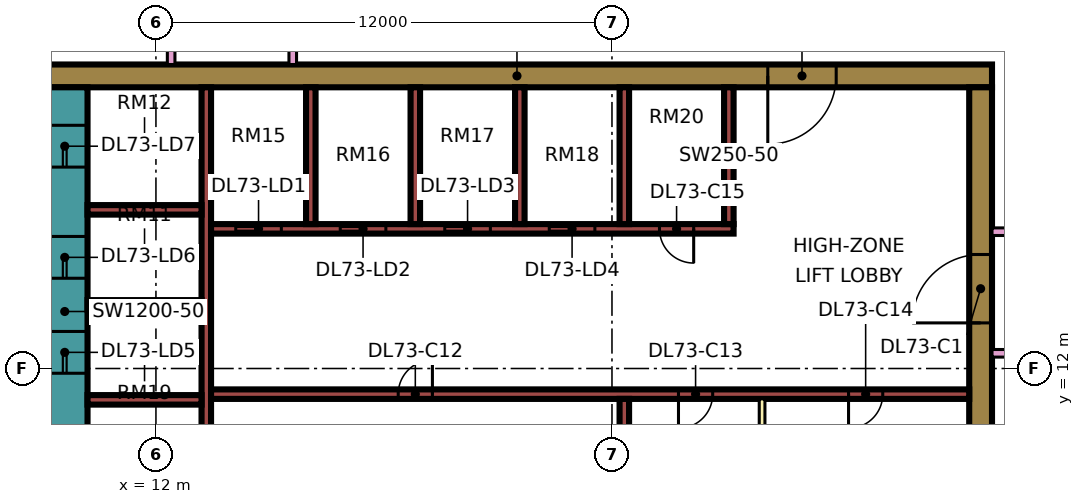
"""IFC4 building model, lengths in metres.
Left out: names, types, materials, properties, quantities, classifications, styles, units other than length and angle.
Written with IfcOpenShell. Run it as: python <this file> out.ifc"""

import sys

from ifc_helpers import new_model, si_unit, direction, frame, frame_2d, origin, place, context, subcontext, project, spatial, rectangle, extrude, element, fill, save


model = new_model("IFC4")
c1 = context("Model", 3, precision=1e-05, world=origin(), true_north=direction((0.0, 1.0)))
c2 = subcontext(c1, "Body", "Model", "MODEL_VIEW")
j1 = project(units=[si_unit("LENGTHUNIT", "METRE"), si_unit("PLANEANGLEUNIT", "RADIAN")], contexts=[c1])
p1 = place(None, origin())
s1 = spatial("IfcSite", under=j1, at=p1, CompositionType="ELEMENT")
p2 = place(p1, origin())
s2 = spatial("IfcBuilding", under=s1, at=p2, CompositionType="ELEMENT")
p3 = place(p2, frame((0.0, 0.0, 310.9)))
s3 = spatial("IfcBuildingStorey", under=s2, at=p3, CompositionType="ELEMENT", Elevation=310.9)
p4 = place(p3, frame((9.0, 19.7, 0.0), z_axis=(0.0, 0.0, 1.0), x_axis=(1.0, 0.0, 0.0)))
e1 = element("IfcWall", 1, at=p4, inside=s3, PredefinedType="SHEAR", context=c2, shape_type="SweptSolid", body=[
    extrude(rectangle(XDim=25.0, YDim=0.6, at=frame_2d((12.5, 0.0))), origin(), (0.0, 0.0, 1.0), 3.75),
])
p5 = place(p4, frame((19.1, 0.0, 0.0)))
e2 = element("IfcOpeningElement", 2, at=p5, cuts=e1, PredefinedType="OPENING", context=c2, shape_type="SweptSolid", body=[
    extrude(rectangle(XDim=1.8, YDim=2.4, at=frame_2d((0.9, 1.2))), frame((0.0, 0.31, 0.0), z_axis=(0.0, -1.0, 0.0), x_axis=(1.0, 0.0, 0.0)), (0.0, 0.0, 1.0), 0.62),
])
p6 = place(p3, frame((9.6, 7.6, 0.0), z_axis=(0.0, 0.0, 1.0), x_axis=(0.0, 1.0, 0.0)))
e3 = element("IfcWall", 3, at=p6, inside=s3, PredefinedType="SHEAR", context=c2, shape_type="SweptSolid", body=[
    extrude(rectangle(XDim=11.8, YDim=1.2, at=frame_2d((5.9, 0.0))), origin(), (0.0, 0.0, 1.0), 3.75),
])
p7 = place(p6, frame((4.275, 0.0, 0.0)))
e4 = element("IfcOpeningElement", 4, at=p7, cuts=e3, PredefinedType="OPENING", context=c2, shape_type="SweptSolid", body=[
    extrude(rectangle(XDim=1.1, YDim=2.2, at=frame_2d((0.55, 1.1))), frame((0.0, 0.61, 0.0), z_axis=(0.0, -1.0, 0.0), x_axis=(1.0, 0.0, 0.0)), (0.0, 0.0, 1.0), 1.22),
])
p8 = place(p6, frame((6.775, 0.0, 0.0)))
e5 = element("IfcOpeningElement", 5, at=p8, cuts=e3, PredefinedType="OPENING", context=c2, shape_type="SweptSolid", body=[
    extrude(rectangle(XDim=1.1, YDim=2.2, at=frame_2d((0.55, 1.1))), frame((0.0, 0.61, 0.0), z_axis=(0.0, -1.0, 0.0), x_axis=(1.0, 0.0, 0.0)), (0.0, 0.0, 1.0), 1.22),
])
p9 = place(p6, frame((9.7, 0.0, 0.0)))
e6 = element("IfcOpeningElement", 6, at=p9, cuts=e3, PredefinedType="OPENING", context=c2, shape_type="SweptSolid", body=[
    extrude(rectangle(XDim=1.1, YDim=2.2, at=frame_2d((0.55, 1.1))), frame((0.0, 0.61, 0.0), z_axis=(0.0, -1.0, 0.0), x_axis=(1.0, 0.0, 0.0)), (0.0, 0.0, 1.0), 1.22),
])
p10 = place(p6, frame((1.95, 0.0, 0.0)))
e7 = element("IfcOpeningElement", 7, at=p10, cuts=e3, PredefinedType="OPENING", context=c2, shape_type="SweptSolid", body=[
    extrude(rectangle(XDim=0.9, YDim=2.1, at=frame_2d((0.45, 1.05))), frame((0.0, 0.61, 0.0), z_axis=(0.0, -1.0, 0.0), x_axis=(1.0, 0.0, 0.0)), (0.0, 0.0, 1.0), 1.22),
])
p11 = place(p3, frame((33.7, 7.6, 0.0), z_axis=(0.0, 0.0, 1.0), x_axis=(0.0, 1.0, 0.0)))
e8 = element("IfcWall", 8, at=p11, inside=s3, PredefinedType="SHEAR", context=c2, shape_type="SweptSolid", body=[
    extrude(rectangle(XDim=11.8, YDim=0.6, at=frame_2d((5.9, 0.0))), origin(), (0.0, 0.0, 1.0), 3.75),
])
p12 = place(p11, frame((5.6, 0.0, 0.0)))
e9 = element("IfcOpeningElement", 9, at=p12, cuts=e8, PredefinedType="OPENING", context=c2, shape_type="SweptSolid", body=[
    extrude(rectangle(XDim=1.8, YDim=2.4, at=frame_2d((0.9, 1.2))), frame((0.0, 0.31, 0.0), z_axis=(0.0, -1.0, 0.0), x_axis=(1.0, 0.0, 0.0)), (0.0, 0.0, 1.0), 0.62),
])
p13 = place(p3, frame((13.325, 7.6, 0.0), z_axis=(0.0, 0.0, 1.0), x_axis=(0.0, 1.0, 0.0)))
e10 = element("IfcWall", 10, at=p13, inside=s3, PredefinedType="SHEAR", context=c2, shape_type="SweptSolid", body=[
    extrude(rectangle(XDim=11.8, YDim=0.25, at=frame_2d((5.9, 0.0))), origin(), (0.0, 0.0, 1.0), 3.75),
])
p14 = place(p3, frame((13.45, 11.325, 0.0), z_axis=(0.0, 0.0, 1.0), x_axis=(1.0, 0.0, 0.0)))
e11 = element("IfcWall", 11, at=p14, inside=s3, PredefinedType="SHEAR", context=c2, shape_type="SweptSolid", body=[
    extrude(rectangle(XDim=19.95, YDim=0.25, at=frame_2d((9.975, 0.0))), origin(), (0.0, 0.0, 1.0), 3.75),
])
p15 = place(p14, frame((4.925, 0.0, 0.0)))
e12 = element("IfcOpeningElement", 12, at=p15, cuts=e11, PredefinedType="OPENING", context=c2, shape_type="SweptSolid", body=[
    extrude(rectangle(XDim=0.9, YDim=2.1, at=frame_2d((0.45, 1.05))), frame((0.0, 0.135, 0.0), z_axis=(0.0, -1.0, 0.0), x_axis=(1.0, 0.0, 0.0)), (0.0, 0.0, 1.0), 0.27),
])
p16 = place(p14, frame((12.3, 0.0, 0.0)))
e13 = element("IfcOpeningElement", 13, at=p16, cuts=e11, PredefinedType="OPENING", context=c2, shape_type="SweptSolid", body=[
    extrude(rectangle(XDim=0.9, YDim=2.1, at=frame_2d((0.45, 1.05))), frame((0.0, 0.135, 0.0), z_axis=(0.0, -1.0, 0.0), x_axis=(1.0, 0.0, 0.0)), (0.0, 0.0, 1.0), 0.27),
])
p17 = place(p14, frame((16.775, 0.0, 0.0)))
e14 = element("IfcOpeningElement", 14, at=p17, cuts=e11, PredefinedType="OPENING", context=c2, shape_type="SweptSolid", body=[
    extrude(rectangle(XDim=0.9, YDim=2.1, at=frame_2d((0.45, 1.05))), frame((0.0, 0.135, 0.0), z_axis=(0.0, -1.0, 0.0), x_axis=(1.0, 0.0, 0.0)), (0.0, 0.0, 1.0), 0.27),
])
p18 = place(p3, frame((13.45, 15.675, 0.0), z_axis=(0.0, 0.0, 1.0), x_axis=(1.0, 0.0, 0.0)))
e15 = element("IfcWall", 15, at=p18, inside=s3, PredefinedType="SHEAR", context=c2, shape_type="SweptSolid", body=[
    extrude(rectangle(XDim=13.75, YDim=0.25, at=frame_2d((6.875, 0.0))), origin(), (0.0, 0.0, 1.0), 3.75),
])
p19 = place(p18, frame((0.65, 0.0, 0.0)))
e16 = element("IfcOpeningElement", 16, at=p19, cuts=e15, PredefinedType="OPENING", context=c2, shape_type="SweptSolid", body=[
    extrude(rectangle(XDim=1.2, YDim=2.2, at=frame_2d((0.6, 1.1))), frame((0.0, 0.135, 0.0), z_axis=(0.0, -1.0, 0.0), x_axis=(1.0, 0.0, 0.0)), (0.0, 0.0, 1.0), 0.27),
])
p20 = place(p18, frame((3.4, 0.0, 0.0)))
e17 = element("IfcOpeningElement", 17, at=p20, cuts=e15, PredefinedType="OPENING", context=c2, shape_type="SweptSolid", body=[
    extrude(rectangle(XDim=1.2, YDim=2.2, at=frame_2d((0.6, 1.1))), frame((0.0, 0.135, 0.0), z_axis=(0.0, -1.0, 0.0), x_axis=(1.0, 0.0, 0.0)), (0.0, 0.0, 1.0), 0.27),
])
p21 = place(p18, frame((6.15, 0.0, 0.0)))
e18 = element("IfcOpeningElement", 18, at=p21, cuts=e15, PredefinedType="OPENING", context=c2, shape_type="SweptSolid", body=[
    extrude(rectangle(XDim=1.2, YDim=2.2, at=frame_2d((0.6, 1.1))), frame((0.0, 0.135, 0.0), z_axis=(0.0, -1.0, 0.0), x_axis=(1.0, 0.0, 0.0)), (0.0, 0.0, 1.0), 0.27),
])
p22 = place(p18, frame((8.9, 0.0, 0.0)))
e19 = element("IfcOpeningElement", 19, at=p22, cuts=e15, PredefinedType="OPENING", context=c2, shape_type="SweptSolid", body=[
    extrude(rectangle(XDim=1.2, YDim=2.2, at=frame_2d((0.6, 1.1))), frame((0.0, 0.135, 0.0), z_axis=(0.0, -1.0, 0.0), x_axis=(1.0, 0.0, 0.0)), (0.0, 0.0, 1.0), 0.27),
])
p23 = place(p18, frame((11.8, 0.0, 0.0)))
e20 = element("IfcOpeningElement", 20, at=p23, cuts=e15, PredefinedType="OPENING", context=c2, shape_type="SweptSolid", body=[
    extrude(rectangle(XDim=0.9, YDim=2.1, at=frame_2d((0.45, 1.05))), frame((0.0, 0.135, 0.0), z_axis=(0.0, -1.0, 0.0), x_axis=(1.0, 0.0, 0.0)), (0.0, 0.0, 1.0), 0.27),
])
for number, where, z_axis, x_axis in (
    (21, (10.2, 11.175, 0.0), (0.0, 0.0, 1.0), (1.0, 0.0, 0.0)),
    (22, (10.2, 13.675, 0.0), (0.0, 0.0, 1.0), (1.0, 0.0, 0.0)),
    (23, (10.2, 16.175, 0.0), (0.0, 0.0, 1.0), (1.0, 0.0, 0.0)),
):
    element("IfcWall", number, at=place(p3, frame(where, z_axis=z_axis, x_axis=x_axis)), inside=s3, PredefinedType="SHEAR", context=c2, shape_type="SweptSolid", body=[
        extrude(rectangle(XDim=3.0, YDim=0.25, at=frame_2d((1.5, 0.0))), origin(), (0.0, 0.0, 1.0), 3.75),
    ])
for number, where, z_axis, x_axis in (
    (24, (24.325, 7.6, 0.0), (0.0, 0.0, 1.0), (0.0, 1.0, 0.0)),
    (25, (16.075, 15.8, 0.0), (0.0, 0.0, 1.0), (0.0, 1.0, 0.0)),
    (26, (18.825, 15.8, 0.0), (0.0, 0.0, 1.0), (0.0, 1.0, 0.0)),
    (27, (21.575, 15.8, 0.0), (0.0, 0.0, 1.0), (0.0, 1.0, 0.0)),
    (28, (24.325, 15.8, 0.0), (0.0, 0.0, 1.0), (0.0, 1.0, 0.0)),
    (29, (27.075, 15.8, 0.0), (0.0, 0.0, 1.0), (0.0, 1.0, 0.0)),
):
    element("IfcWall", number, at=place(p3, frame(where, z_axis=z_axis, x_axis=x_axis)), inside=s3, PredefinedType="SHEAR", context=c2, shape_type="SweptSolid", body=[
        extrude(rectangle(XDim=3.6, YDim=0.25, at=frame_2d((1.8, 0.0))), origin(), (0.0, 0.0, 1.0), 3.75),
    ])
p24 = place(p3, frame((-1.447, 12.553, 0.0), z_axis=(0.0, 0.0, 1.0), x_axis=(0.707106781187, -0.707106781187, 0.0)))
e30 = element("IfcWall", 30, at=p24, inside=s3, PredefinedType="SOLIDWALL", context=c2, shape_type="SweptSolid", body=[
    extrude(rectangle(XDim=19.799, YDim=0.15, at=frame_2d((9.899, 0.0))), origin(), (0.0, 0.0, 1.0), 3.35),
])
p25 = place(p24, frame((2.212, 0.0, 0.45)))
e31 = element("IfcOpeningElement", 31, at=p25, cuts=e30, PredefinedType="OPENING", context=c2, shape_type="SweptSolid", body=[
    extrude(rectangle(XDim=3.0, YDim=2.4, at=frame_2d((1.5, 1.2))), frame((0.0, 0.085, 0.0), z_axis=(0.0, -1.0, 0.0), x_axis=(1.0, 0.0, 0.0)), (0.0, 0.0, 1.0), 0.17),
])
p26 = place(p24, frame((10.216, 0.0, 0.45)))
e32 = element("IfcOpeningElement", 32, at=p26, cuts=e30, PredefinedType="OPENING", context=c2, shape_type="SweptSolid", body=[
    extrude(rectangle(XDim=3.0, YDim=2.4, at=frame_2d((1.5, 1.2))), frame((0.0, 0.085, 0.0), z_axis=(0.0, -1.0, 0.0), x_axis=(1.0, 0.0, 0.0)), (0.0, 0.0, 1.0), 0.17),
])
p27 = place(p3, frame((27.95, 7.6, 0.0), z_axis=(0.0, 0.0, 1.0), x_axis=(0.0, 1.0, 0.0)))
e33 = element("IfcWall", 33, at=p27, inside=s3, PredefinedType="PARTITIONING", context=c2, shape_type="SweptSolid", body=[
    extrude(rectangle(XDim=3.6, YDim=0.15, at=frame_2d((1.8, 0.0))), origin(), (0.0, 0.0, 1.0), 3.35),
])
p28 = place(p3, frame((12.4, 20.0, 0.0), z_axis=(0.0, 0.0, 1.0), x_axis=(0.0, 1.0, 0.0)))
e34 = element("IfcWall", 34, at=p28, inside=s3, PredefinedType="PARTITIONING", context=c2, shape_type="SweptSolid", body=[
    extrude(rectangle(XDim=33.926, YDim=0.2, at=frame_2d((16.963, 0.0))), origin(), (0.0, 0.0, 1.0), 3.35),
])
p29 = place(p28, frame((31.8, 0.0, 0.0)))
e35 = element("IfcOpeningElement", 35, at=p29, cuts=e34, PredefinedType="OPENING", context=c2, shape_type="SweptSolid", body=[
    extrude(rectangle(XDim=1.0, YDim=2.1, at=frame_2d((0.5, 1.05))), frame((0.0, 0.11, 0.0), z_axis=(0.0, -1.0, 0.0), x_axis=(1.0, 0.0, 0.0)), (0.0, 0.0, 1.0), 0.22),
])
p30 = place(p28, frame((0.6, 0.0, 0.0)))
e36 = element("IfcOpeningElement", 36, at=p30, cuts=e34, PredefinedType="OPENING", context=c2, shape_type="SweptSolid", body=[
    extrude(rectangle(XDim=1.2, YDim=2.1, at=frame_2d((0.6, 1.05))), frame((0.0, 0.11, 0.0), z_axis=(0.0, -1.0, 0.0), x_axis=(1.0, 0.0, 0.0)), (0.0, 0.0, 1.0), 0.22),
])
p31 = place(p28, frame((4.5, 0.0, 0.0)))
e37 = element("IfcOpeningElement", 37, at=p31, cuts=e34, PredefinedType="OPENING", context=c2, shape_type="SweptSolid", body=[
    extrude(rectangle(XDim=1.0, YDim=2.1, at=frame_2d((0.5, 1.05))), frame((0.0, 0.11, 0.0), z_axis=(0.0, -1.0, 0.0), x_axis=(1.0, 0.0, 0.0)), (0.0, 0.0, 1.0), 0.22),
])
p32 = place(p3, frame((15.6, 20.0, 0.0), z_axis=(0.0, 0.0, 1.0), x_axis=(0.0, 1.0, 0.0)))
e38 = element("IfcWall", 38, at=p32, inside=s3, PredefinedType="PARTITIONING", context=c2, shape_type="SweptSolid", body=[
    extrude(rectangle(XDim=27.775, YDim=0.2, at=frame_2d((13.887, 0.0))), origin(), (0.0, 0.0, 1.0), 3.35),
])
p33 = place(p32, frame((6.7, 0.0, 0.0)))
e39 = element("IfcOpeningElement", 39, at=p33, cuts=e38, PredefinedType="OPENING", context=c2, shape_type="SweptSolid", body=[
    extrude(rectangle(XDim=1.6, YDim=2.1, at=frame_2d((0.8, 1.05))), frame((0.0, 0.11, 0.0), z_axis=(0.0, -1.0, 0.0), x_axis=(1.0, 0.0, 0.0)), (0.0, 0.0, 1.0), 0.22),
])
p34 = place(p32, frame((12.95, 0.0, 0.0)))
e40 = element("IfcOpeningElement", 40, at=p34, cuts=e38, PredefinedType="OPENING", context=c2, shape_type="SweptSolid", body=[
    extrude(rectangle(XDim=1.0, YDim=2.1, at=frame_2d((0.5, 1.05))), frame((0.0, 0.11, 0.0), z_axis=(0.0, -1.0, 0.0), x_axis=(1.0, 0.0, 0.0)), (0.0, 0.0, 1.0), 0.22),
])
p35 = place(p32, frame((16.75, 0.0, 0.0)))
e41 = element("IfcOpeningElement", 41, at=p35, cuts=e38, PredefinedType="OPENING", context=c2, shape_type="SweptSolid", body=[
    extrude(rectangle(XDim=1.0, YDim=2.1, at=frame_2d((0.5, 1.05))), frame((0.0, 0.11, 0.0), z_axis=(0.0, -1.0, 0.0), x_axis=(1.0, 0.0, 0.0)), (0.0, 0.0, 1.0), 0.22),
])
p36 = place(p32, frame((1.15, 0.0, 0.0)))
e42 = element("IfcOpeningElement", 42, at=p36, cuts=e38, PredefinedType="OPENING", context=c2, shape_type="SweptSolid", body=[
    extrude(rectangle(XDim=1.8, YDim=2.1, at=frame_2d((0.9, 1.05))), frame((0.0, 0.11, 0.0), z_axis=(0.0, -1.0, 0.0), x_axis=(1.0, 0.0, 0.0)), (0.0, 0.0, 1.0), 0.22),
])
p37 = place(p32, frame((25.9, 0.0, 0.0)))
e43 = element("IfcOpeningElement", 43, at=p37, cuts=e38, PredefinedType="OPENING", context=c2, shape_type="SweptSolid", body=[
    extrude(rectangle(XDim=1.0, YDim=2.1, at=frame_2d((0.5, 1.05))), frame((0.0, 0.11, 0.0), z_axis=(0.0, -1.0, 0.0), x_axis=(1.0, 0.0, 0.0)), (0.0, 0.0, 1.0), 0.22),
])
p38 = place(p3, frame((34.0, 12.4, 0.0), z_axis=(0.0, 0.0, 1.0), x_axis=(1.0, 0.0, 0.0)))
e44 = element("IfcWall", 44, at=p38, inside=s3, PredefinedType="PARTITIONING", context=c2, shape_type="SweptSolid", body=[
    extrude(rectangle(XDim=2.401, YDim=0.2, at=frame_2d((1.2, 0.0))), origin(), (0.0, 0.0, 1.0), 3.35),
])
p39 = place(p3, frame((34.0, 15.6, 0.0), z_axis=(0.0, 0.0, 1.0), x_axis=(1.0, 0.0, 0.0)))
e45 = element("IfcWall", 45, at=p39, inside=s3, PredefinedType="PARTITIONING", context=c2, shape_type="SweptSolid", body=[
    extrude(rectangle(XDim=10.35, YDim=0.2, at=frame_2d((5.175, 0.0))), origin(), (0.0, 0.0, 1.0), 3.35),
])
p40 = place(p39, frame((5.6, 0.0, 0.0)))
e46 = element("IfcOpeningElement", 46, at=p40, cuts=e45, PredefinedType="OPENING", context=c2, shape_type="SweptSolid", body=[
    extrude(rectangle(XDim=1.0, YDim=2.1, at=frame_2d((0.5, 1.05))), frame((0.0, 0.11, 0.0), z_axis=(0.0, -1.0, 0.0), x_axis=(1.0, 0.0, 0.0)), (0.0, 0.0, 1.0), 0.22),
])
p41 = place(p39, frame((0.45, 0.0, 0.0)))
e47 = element("IfcOpeningElement", 47, at=p41, cuts=e45, PredefinedType="OPENING", context=c2, shape_type="SweptSolid", body=[
    extrude(rectangle(XDim=1.2, YDim=2.1, at=frame_2d((0.6, 1.05))), frame((0.0, 0.11, 0.0), z_axis=(0.0, -1.0, 0.0), x_axis=(1.0, 0.0, 0.0)), (0.0, 0.0, 1.0), 0.22),
])
p42 = place(p19, origin())
e48 = element("IfcDoor", 48, at=p42, inside=s3, OperationType="DOUBLE_DOOR_SLIDING", PredefinedType="DOOR", context=c2, shape_type="SweptSolid", body=[
    extrude(rectangle(XDim=1.2, YDim=2.2, at=frame_2d((0.6, 1.1))), frame((0.0, 0.025, 0.0), z_axis=(0.0, -1.0, 0.0), x_axis=(1.0, 0.0, 0.0)), (0.0, 0.0, 1.0), 0.05),
])
fill(e16, e48)
p43 = place(p20, origin())
e49 = element("IfcDoor", 49, at=p43, inside=s3, OperationType="DOUBLE_DOOR_SLIDING", PredefinedType="DOOR", context=c2, shape_type="SweptSolid", body=[
    extrude(rectangle(XDim=1.2, YDim=2.2, at=frame_2d((0.6, 1.1))), frame((0.0, 0.025, 0.0), z_axis=(0.0, -1.0, 0.0), x_axis=(1.0, 0.0, 0.0)), (0.0, 0.0, 1.0), 0.05),
])
fill(e17, e49)
p44 = place(p21, origin())
e50 = element("IfcDoor", 50, at=p44, inside=s3, OperationType="DOUBLE_DOOR_SLIDING", PredefinedType="DOOR", context=c2, shape_type="SweptSolid", body=[
    extrude(rectangle(XDim=1.2, YDim=2.2, at=frame_2d((0.6, 1.1))), frame((0.0, 0.025, 0.0), z_axis=(0.0, -1.0, 0.0), x_axis=(1.0, 0.0, 0.0)), (0.0, 0.0, 1.0), 0.05),
])
fill(e18, e50)
p45 = place(p22, origin())
e51 = element("IfcDoor", 51, at=p45, inside=s3, OperationType="DOUBLE_DOOR_SLIDING", PredefinedType="DOOR", context=c2, shape_type="SweptSolid", body=[
    extrude(rectangle(XDim=1.2, YDim=2.2, at=frame_2d((0.6, 1.1))), frame((0.0, 0.025, 0.0), z_axis=(0.0, -1.0, 0.0), x_axis=(1.0, 0.0, 0.0)), (0.0, 0.0, 1.0), 0.05),
])
fill(e19, e51)
p46 = place(p7, origin())
e52 = element("IfcDoor", 52, at=p46, inside=s3, OperationType="DOUBLE_DOOR_SLIDING", PredefinedType="DOOR", context=c2, shape_type="SweptSolid", body=[
    extrude(rectangle(XDim=1.1, YDim=2.2, at=frame_2d((0.55, 1.1))), frame((0.0, 0.025, 0.0), z_axis=(0.0, -1.0, 0.0), x_axis=(1.0, 0.0, 0.0)), (0.0, 0.0, 1.0), 0.05),
])
fill(e4, e52)
p47 = place(p8, origin())
e53 = element("IfcDoor", 53, at=p47, inside=s3, OperationType="DOUBLE_DOOR_SLIDING", PredefinedType="DOOR", context=c2, shape_type="SweptSolid", body=[
    extrude(rectangle(XDim=1.1, YDim=2.2, at=frame_2d((0.55, 1.1))), frame((0.0, 0.025, 0.0), z_axis=(0.0, -1.0, 0.0), x_axis=(1.0, 0.0, 0.0)), (0.0, 0.0, 1.0), 0.05),
])
fill(e5, e53)
p48 = place(p9, origin())
e54 = element("IfcDoor", 54, at=p48, inside=s3, OperationType="DOUBLE_DOOR_SLIDING", PredefinedType="DOOR", context=c2, shape_type="SweptSolid", body=[
    extrude(rectangle(XDim=1.1, YDim=2.2, at=frame_2d((0.55, 1.1))), frame((0.0, 0.025, 0.0), z_axis=(0.0, -1.0, 0.0), x_axis=(1.0, 0.0, 0.0)), (0.0, 0.0, 1.0), 0.05),
])
fill(e6, e54)
p49 = place(p12, origin())
e55 = element("IfcDoor", 55, at=p49, inside=s3, OperationType="DOUBLE_DOOR_SINGLE_SWING", PredefinedType="DOOR", context=c2, shape_type="SweptSolid", body=[
    extrude(rectangle(XDim=1.8, YDim=2.4, at=frame_2d((0.9, 1.2))), frame((0.0, 0.025, 0.0), z_axis=(0.0, -1.0, 0.0), x_axis=(1.0, 0.0, 0.0)), (0.0, 0.0, 1.0), 0.05),
])
fill(e9, e55)
p50 = place(p5, frame((1.8, 0.0, 0.0), z_axis=(0.0, 0.0, 1.0), x_axis=(-1.0, 0.0, 0.0)))
e56 = element("IfcDoor", 56, at=p50, inside=s3, OperationType="DOUBLE_DOOR_SINGLE_SWING", PredefinedType="DOOR", context=c2, shape_type="SweptSolid", body=[
    extrude(rectangle(XDim=1.8, YDim=2.4, at=frame_2d((0.9, 1.2))), frame((0.0, 0.025, 0.0), z_axis=(0.0, -1.0, 0.0), x_axis=(1.0, 0.0, 0.0)), (0.0, 0.0, 1.0), 0.05),
])
fill(e2, e56)
p51 = place(p15, frame((0.9, 0.0, 0.0), z_axis=(0.0, 0.0, 1.0), x_axis=(-1.0, 0.0, 0.0)))
e57 = element("IfcDoor", 57, at=p51, inside=s3, OperationType="SINGLE_SWING_RIGHT", PredefinedType="DOOR", context=c2, shape_type="SweptSolid", body=[
    extrude(rectangle(XDim=0.9, YDim=2.1, at=frame_2d((0.45, 1.05))), frame((0.0, 0.025, 0.0), z_axis=(0.0, -1.0, 0.0), x_axis=(1.0, 0.0, 0.0)), (0.0, 0.0, 1.0), 0.05),
])
fill(e12, e57)
p52 = place(p16, frame((0.9, 0.0, 0.0), z_axis=(0.0, 0.0, 1.0), x_axis=(-1.0, 0.0, 0.0)))
e58 = element("IfcDoor", 58, at=p52, inside=s3, OperationType="SINGLE_SWING_LEFT", PredefinedType="DOOR", context=c2, shape_type="SweptSolid", body=[
    extrude(rectangle(XDim=0.9, YDim=2.1, at=frame_2d((0.45, 1.05))), frame((0.0, 0.025, 0.0), z_axis=(0.0, -1.0, 0.0), x_axis=(1.0, 0.0, 0.0)), (0.0, 0.0, 1.0), 0.05),
])
fill(e13, e58)
p53 = place(p17, frame((0.9, 0.0, 0.0), z_axis=(0.0, 0.0, 1.0), x_axis=(-1.0, 0.0, 0.0)))
e59 = element("IfcDoor", 59, at=p53, inside=s3, OperationType="SINGLE_SWING_LEFT", PredefinedType="DOOR", context=c2, shape_type="SweptSolid", body=[
    extrude(rectangle(XDim=0.9, YDim=2.1, at=frame_2d((0.45, 1.05))), frame((0.0, 0.025, 0.0), z_axis=(0.0, -1.0, 0.0), x_axis=(1.0, 0.0, 0.0)), (0.0, 0.0, 1.0), 0.05),
])
fill(e14, e59)
p54 = place(p23, origin())
e60 = element("IfcDoor", 60, at=p54, inside=s3, OperationType="SINGLE_SWING_RIGHT", PredefinedType="DOOR", context=c2, shape_type="SweptSolid", body=[
    extrude(rectangle(XDim=0.9, YDim=2.1, at=frame_2d((0.45, 1.05))), frame((0.0, 0.025, 0.0), z_axis=(0.0, -1.0, 0.0), x_axis=(1.0, 0.0, 0.0)), (0.0, 0.0, 1.0), 0.05),
])
fill(e20, e60)
save(model, sys.argv[1])
